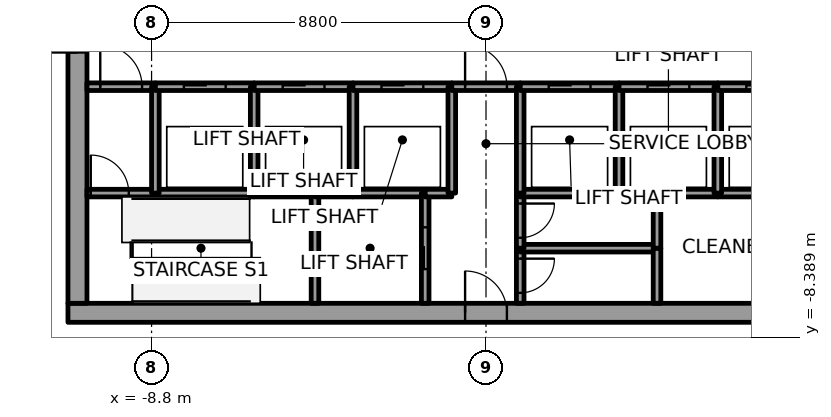
"""IFC4 building model, lengths in metres.
Left out: names, types, materials, properties, quantities, classifications, styles, units other than length and angle.
Written with IfcOpenShell. Run it as: python <this file> out.ifc"""

import sys

from ifc_helpers import new_model, si_unit, direction, frame, frame_2d, origin, place, context, subcontext, project, spatial, rectangle, extrude, element, fill, save


model = new_model("IFC4")
c1 = context("Model", 3, precision=1e-05, world=origin(), true_north=direction((0.0, 1.0)))
c2 = subcontext(c1, "Body", "Model", "MODEL_VIEW")
j1 = project(units=[si_unit("LENGTHUNIT", "METRE"), si_unit("PLANEANGLEUNIT", "RADIAN")], contexts=[c1])
p1 = place(None, origin())
s1 = spatial("IfcSite", under=j1, at=p1, CompositionType="ELEMENT")
p2 = place(p1, origin())
s2 = spatial("IfcBuilding", under=s1, at=p2, CompositionType="ELEMENT")
p3 = place(p2, frame((0.0, 0.0, 185.8)))
s3 = spatial("IfcBuildingStorey", under=s2, at=p3, CompositionType="ELEMENT", Elevation=185.8)
p4 = place(p3, frame((-11.0, -7.75, 0.0), z_axis=(0.0, 0.0, 1.0), x_axis=(1.0, 0.0, 0.0)))
e1 = element("IfcWall", 1, at=p4, inside=s3, PredefinedType="SHEAR", context=c2, shape_type="SweptSolid", body=[
    extrude(rectangle(XDim=22.0, YDim=0.5, at=frame_2d((11.0, 0.0))), origin(), (0.0, 0.0, 1.0), 4.0),
])
p5 = place(p4, frame((10.45, 0.0, 0.0)))
e2 = element("IfcOpeningElement", 2, at=p5, cuts=e1, PredefinedType="OPENING", context=c2, shape_type="SweptSolid", body=[
    extrude(rectangle(XDim=1.1, YDim=2.1, at=frame_2d((0.55, 1.05))), frame((0.0, 0.25, 0.0), z_axis=(0.0, -1.0, 0.0), x_axis=(1.0, 0.0, 0.0)), (0.0, 0.0, 1.0), 0.5),
])
p6 = place(p3, frame((-10.75, -7.5, 0.0), z_axis=(0.0, 0.0, 1.0), x_axis=(0.0, 1.0, 0.0)))
e3 = element("IfcWall", 3, at=p6, inside=s3, PredefinedType="SHEAR", context=c2, shape_type="SweptSolid", body=[
    extrude(rectangle(XDim=15.0, YDim=0.5, at=frame_2d((7.5, 0.0))), origin(), (0.0, 0.0, 1.0), 4.0),
])
p7 = place(p6, frame((6.6, 0.0, 0.0)))
e4 = element("IfcOpeningElement", 4, at=p7, cuts=e3, PredefinedType="OPENING", context=c2, shape_type="SweptSolid", body=[
    extrude(rectangle(XDim=1.8, YDim=2.1, at=frame_2d((0.9, 1.05))), frame((0.0, 0.25, 0.0), z_axis=(0.0, -1.0, 0.0), x_axis=(1.0, 0.0, 0.0)), (0.0, 0.0, 1.0), 0.5),
])
p8 = place(p3, frame((-10.5, -4.6, 0.0), z_axis=(0.0, 0.0, 1.0), x_axis=(1.0, 0.0, 0.0)))
e5 = element("IfcWall", 5, at=p8, inside=s3, PredefinedType="SOLIDWALL", context=c2, shape_type="SweptSolid", body=[
    extrude(rectangle(XDim=1.8, YDim=0.2, at=frame_2d((0.9, 0.0))), origin(), (0.0, 0.0, 1.0), 3.85),
])
p9 = place(p8, frame((0.1, 0.0, 0.0)))
e6 = element("IfcOpeningElement", 6, at=p9, cuts=e5, PredefinedType="OPENING", context=c2, shape_type="SweptSolid", body=[
    extrude(rectangle(XDim=1.0, YDim=2.1, at=frame_2d((0.5, 1.05))), frame((0.0, 0.1, 0.0), z_axis=(0.0, -1.0, 0.0), x_axis=(1.0, 0.0, 0.0)), (0.0, 0.0, 1.0), 0.2),
])
p10 = place(p3, frame((-10.5, -1.8, 0.0), z_axis=(0.0, 0.0, 1.0), x_axis=(1.0, 0.0, 0.0)))
e7 = element("IfcWall", 7, at=p10, inside=s3, PredefinedType="SOLIDWALL", context=c2, shape_type="SweptSolid", body=[
    extrude(rectangle(XDim=1.8, YDim=0.2, at=frame_2d((0.9, 0.0))), origin(), (0.0, 0.0, 1.0), 3.85),
])
p11 = place(p10, frame((0.35, 0.0, 0.0)))
e8 = element("IfcOpeningElement", 8, at=p11, cuts=e7, PredefinedType="OPENING", context=c2, shape_type="SweptSolid", body=[
    extrude(rectangle(XDim=1.1, YDim=2.1, at=frame_2d((0.55, 1.05))), frame((0.0, 0.1, 0.0), z_axis=(0.0, -1.0, 0.0), x_axis=(1.0, 0.0, 0.0)), (0.0, 0.0, 1.0), 0.2),
])
p12 = place(p3, frame((-8.7, -4.6, 0.0), z_axis=(0.0, 0.0, 1.0), x_axis=(1.0, 0.0, 0.0)))
e9 = element("IfcWall", 9, at=p12, inside=s3, PredefinedType="SOLIDWALL", context=c2, shape_type="SweptSolid", body=[
    extrude(rectangle(XDim=2.6, YDim=0.2, at=frame_2d((1.3, 0.0))), origin(), (0.0, 0.0, 1.0), 3.85),
])
p13 = place(p3, frame((-8.7, -4.6, 0.0), z_axis=(0.0, 0.0, 1.0), x_axis=(0.0, 1.0, 0.0)))
e10 = element("IfcWall", 10, at=p13, inside=s3, PredefinedType="SOLIDWALL", context=c2, shape_type="SweptSolid", body=[
    extrude(rectangle(XDim=2.8, YDim=0.2, at=frame_2d((1.4, 0.0))), origin(), (0.0, 0.0, 1.0), 3.85),
])
p14 = place(p3, frame((-8.7, -1.8, 0.0), z_axis=(0.0, 0.0, 1.0), x_axis=(1.0, 0.0, 0.0)))
e11 = element("IfcWall", 11, at=p14, inside=s3, PredefinedType="SOLIDWALL", context=c2, shape_type="SweptSolid", body=[
    extrude(rectangle(XDim=2.6, YDim=0.2, at=frame_2d((1.3, 0.0))), origin(), (0.0, 0.0, 1.0), 3.85),
])
p15 = place(p14, frame((0.75, 0.0, 0.0)))
e12 = element("IfcOpeningElement", 12, at=p15, cuts=e11, PredefinedType="OPENING", context=c2, shape_type="SweptSolid", body=[
    extrude(rectangle(XDim=1.1, YDim=2.1, at=frame_2d((0.55, 1.05))), frame((0.0, 0.1, 0.0), z_axis=(0.0, -1.0, 0.0), x_axis=(1.0, 0.0, 0.0)), (0.0, 0.0, 1.0), 0.2),
])
p16 = place(p3, frame((-6.1, -4.6, 0.0), z_axis=(0.0, 0.0, 1.0), x_axis=(1.0, 0.0, 0.0)))
e13 = element("IfcWall", 13, at=p16, inside=s3, PredefinedType="SOLIDWALL", context=c2, shape_type="SweptSolid", body=[
    extrude(rectangle(XDim=1.6, YDim=0.2, at=frame_2d((0.8, 0.0))), origin(), (0.0, 0.0, 1.0), 3.85),
])
p17 = place(p3, frame((-6.1, -4.6, 0.0), z_axis=(0.0, 0.0, 1.0), x_axis=(0.0, 1.0, 0.0)))
e14 = element("IfcWall", 14, at=p17, inside=s3, PredefinedType="SOLIDWALL", context=c2, shape_type="SweptSolid", body=[
    extrude(rectangle(XDim=2.8, YDim=0.2, at=frame_2d((1.4, 0.0))), origin(), (0.0, 0.0, 1.0), 3.85),
])
p18 = place(p3, frame((-6.1, -1.8, 0.0), z_axis=(0.0, 0.0, 1.0), x_axis=(1.0, 0.0, 0.0)))
e15 = element("IfcWall", 15, at=p18, inside=s3, PredefinedType="SOLIDWALL", context=c2, shape_type="SweptSolid", body=[
    extrude(rectangle(XDim=2.6, YDim=0.2, at=frame_2d((1.3, 0.0))), origin(), (0.0, 0.0, 1.0), 3.85),
])
p19 = place(p18, frame((0.75, 0.0, 0.0)))
e16 = element("IfcOpeningElement", 16, at=p19, cuts=e15, PredefinedType="OPENING", context=c2, shape_type="SweptSolid", body=[
    extrude(rectangle(XDim=1.1, YDim=2.1, at=frame_2d((0.55, 1.05))), frame((0.0, 0.1, 0.0), z_axis=(0.0, -1.0, 0.0), x_axis=(1.0, 0.0, 0.0)), (0.0, 0.0, 1.0), 0.2),
])
p20 = place(p3, frame((-4.5, -4.6, 0.0), z_axis=(0.0, 0.0, 1.0), x_axis=(0.0, -1.0, 0.0)))
e17 = element("IfcWall", 17, at=p20, inside=s3, PredefinedType="SOLIDWALL", context=c2, shape_type="SweptSolid", body=[
    extrude(rectangle(XDim=2.9, YDim=0.2, at=frame_2d((1.45, 0.0))), origin(), (0.0, 0.0, 1.0), 3.85),
])
p21 = place(p3, frame((-4.5, -4.6, 0.0), z_axis=(0.0, 0.0, 1.0), x_axis=(1.0, 0.0, 0.0)))
e18 = element("IfcWall", 18, at=p21, inside=s3, PredefinedType="SOLIDWALL", context=c2, shape_type="SweptSolid", body=[
    extrude(rectangle(XDim=1.0, YDim=0.2, at=frame_2d((0.5, 0.0))), origin(), (0.0, 0.0, 1.0), 3.85),
])
p22 = place(p3, frame((-3.5, -4.6, 0.0), z_axis=(0.0, 0.0, 1.0), x_axis=(1.0, 0.0, 0.0)))
e19 = element("IfcWall", 19, at=p22, inside=s3, PredefinedType="SOLIDWALL", context=c2, shape_type="SweptSolid", body=[
    extrude(rectangle(XDim=1.9, YDim=0.2, at=frame_2d((0.95, 0.0))), origin(), (0.0, 0.0, 1.0), 3.85),
])
p23 = place(p3, frame((-3.5, -4.6, 0.0), z_axis=(0.0, 0.0, 1.0), x_axis=(0.0, 1.0, 0.0)))
e20 = element("IfcWall", 20, at=p23, inside=s3, PredefinedType="SOLIDWALL", context=c2, shape_type="SweptSolid", body=[
    extrude(rectangle(XDim=2.8, YDim=0.2, at=frame_2d((1.4, 0.0))), origin(), (0.0, 0.0, 1.0), 3.85),
])
p24 = place(p3, frame((-3.5, -1.8, 0.0), z_axis=(0.0, 0.0, 1.0), x_axis=(1.0, 0.0, 0.0)))
e21 = element("IfcWall", 21, at=p24, inside=s3, PredefinedType="SOLIDWALL", context=c2, shape_type="SweptSolid", body=[
    extrude(rectangle(XDim=2.6, YDim=0.2, at=frame_2d((1.3, 0.0))), origin(), (0.0, 0.0, 1.0), 3.85),
])
p25 = place(p24, frame((0.75, 0.0, 0.0)))
e22 = element("IfcOpeningElement", 22, at=p25, cuts=e21, PredefinedType="OPENING", context=c2, shape_type="SweptSolid", body=[
    extrude(rectangle(XDim=1.1, YDim=2.1, at=frame_2d((0.55, 1.05))), frame((0.0, 0.1, 0.0), z_axis=(0.0, -1.0, 0.0), x_axis=(1.0, 0.0, 0.0)), (0.0, 0.0, 1.0), 0.2),
])
p26 = place(p3, frame((-1.6, -7.5, 0.0), z_axis=(0.0, 0.0, 1.0), x_axis=(0.0, 1.0, 0.0)))
e23 = element("IfcWall", 23, at=p26, inside=s3, PredefinedType="SOLIDWALL", context=c2, shape_type="SweptSolid", body=[
    extrude(rectangle(XDim=2.9, YDim=0.2, at=frame_2d((1.45, 0.0))), origin(), (0.0, 0.0, 1.0), 3.85),
])
p27 = place(p26, frame((0.9, 0.0, 0.0)))
e24 = element("IfcOpeningElement", 24, at=p27, cuts=e23, PredefinedType="OPENING", context=c2, shape_type="SweptSolid", body=[
    extrude(rectangle(XDim=1.1, YDim=2.1, at=frame_2d((0.55, 1.05))), frame((0.0, 0.1, 0.0), z_axis=(0.0, -1.0, 0.0), x_axis=(1.0, 0.0, 0.0)), (0.0, 0.0, 1.0), 0.2),
])
p28 = place(p3, frame((-1.6, -4.6, 0.0), z_axis=(0.0, 0.0, 1.0), x_axis=(1.0, 0.0, 0.0)))
e25 = element("IfcWall", 25, at=p28, inside=s3, PredefinedType="SOLIDWALL", context=c2, shape_type="SweptSolid", body=[
    extrude(rectangle(XDim=0.7, YDim=0.2, at=frame_2d((0.35, 0.0))), origin(), (0.0, 0.0, 1.0), 3.85),
])
p29 = place(p3, frame((-0.9, -4.6, 0.0), z_axis=(0.0, 0.0, 1.0), x_axis=(0.0, 1.0, 0.0)))
e26 = element("IfcWall", 26, at=p29, inside=s3, PredefinedType="SOLIDWALL", context=c2, shape_type="SweptSolid", body=[
    extrude(rectangle(XDim=2.8, YDim=0.2, at=frame_2d((1.4, 0.0))), origin(), (0.0, 0.0, 1.0), 3.85),
])
p30 = place(p3, frame((-0.9, -1.8, 0.0), z_axis=(0.0, 0.0, 1.0), x_axis=(1.0, 0.0, 0.0)))
e27 = element("IfcWall", 27, at=p30, inside=s3, PredefinedType="SOLIDWALL", context=c2, shape_type="SweptSolid", body=[
    extrude(rectangle(XDim=1.8, YDim=0.2, at=frame_2d((0.9, 0.0))), origin(), (0.0, 0.0, 1.0), 3.85),
])
p31 = place(p30, frame((0.35, 0.0, 0.0)))
e28 = element("IfcOpeningElement", 28, at=p31, cuts=e27, PredefinedType="OPENING", context=c2, shape_type="SweptSolid", body=[
    extrude(rectangle(XDim=1.1, YDim=2.1, at=frame_2d((0.55, 1.05))), frame((0.0, 0.1, 0.0), z_axis=(0.0, -1.0, 0.0), x_axis=(1.0, 0.0, 0.0)), (0.0, 0.0, 1.0), 0.2),
])
p32 = place(p3, frame((0.9, -6.05, 0.0), z_axis=(0.0, 0.0, 1.0), x_axis=(0.0, -1.0, 0.0)))
e29 = element("IfcWall", 29, at=p32, inside=s3, PredefinedType="SOLIDWALL", context=c2, shape_type="SweptSolid", body=[
    extrude(rectangle(XDim=1.45, YDim=0.2, at=frame_2d((0.725, 0.0))), origin(), (0.0, 0.0, 1.0), 3.85),
])
p33 = place(p32, frame((0.275, 0.0, 0.0)))
e30 = element("IfcOpeningElement", 30, at=p33, cuts=e29, PredefinedType="OPENING", context=c2, shape_type="SweptSolid", body=[
    extrude(rectangle(XDim=0.9, YDim=2.1, at=frame_2d((0.45, 1.05))), frame((0.0, 0.1, 0.0), z_axis=(0.0, -1.0, 0.0), x_axis=(1.0, 0.0, 0.0)), (0.0, 0.0, 1.0), 0.2),
])
p34 = place(p3, frame((4.5, -6.05, 0.0), z_axis=(0.0, 0.0, 1.0), x_axis=(-1.0, 0.0, 0.0)))
e31 = element("IfcWall", 31, at=p34, inside=s3, PredefinedType="SOLIDWALL", context=c2, shape_type="SweptSolid", body=[
    extrude(rectangle(XDim=3.6, YDim=0.2, at=frame_2d((1.8, 0.0))), origin(), (0.0, 0.0, 1.0), 3.85),
])
p35 = place(p3, frame((0.9, -4.6, 0.0), z_axis=(0.0, 0.0, 1.0), x_axis=(0.0, -1.0, 0.0)))
e32 = element("IfcWall", 32, at=p35, inside=s3, PredefinedType="SOLIDWALL", context=c2, shape_type="SweptSolid", body=[
    extrude(rectangle(XDim=1.45, YDim=0.2, at=frame_2d((0.725, 0.0))), origin(), (0.0, 0.0, 1.0), 3.85),
])
p36 = place(p35, frame((0.275, 0.0, 0.0)))
e33 = element("IfcOpeningElement", 33, at=p36, cuts=e32, PredefinedType="OPENING", context=c2, shape_type="SweptSolid", body=[
    extrude(rectangle(XDim=0.9, YDim=2.1, at=frame_2d((0.45, 1.05))), frame((0.0, 0.1, 0.0), z_axis=(0.0, -1.0, 0.0), x_axis=(1.0, 0.0, 0.0)), (0.0, 0.0, 1.0), 0.2),
])
p37 = place(p3, frame((3.5, -4.6, 0.0), z_axis=(0.0, 0.0, 1.0), x_axis=(-1.0, 0.0, 0.0)))
e34 = element("IfcWall", 34, at=p37, inside=s3, PredefinedType="SOLIDWALL", context=c2, shape_type="SweptSolid", body=[
    extrude(rectangle(XDim=2.6, YDim=0.2, at=frame_2d((1.3, 0.0))), origin(), (0.0, 0.0, 1.0), 3.85),
])
p38 = place(p3, frame((0.9, -1.8, 0.0), z_axis=(0.0, 0.0, 1.0), x_axis=(0.0, -1.0, 0.0)))
e35 = element("IfcWall", 35, at=p38, inside=s3, PredefinedType="SOLIDWALL", context=c2, shape_type="SweptSolid", body=[
    extrude(rectangle(XDim=2.8, YDim=0.2, at=frame_2d((1.4, 0.0))), origin(), (0.0, 0.0, 1.0), 3.85),
])
p39 = place(p3, frame((0.9, -1.8, 0.0), z_axis=(0.0, 0.0, 1.0), x_axis=(1.0, 0.0, 0.0)))
e36 = element("IfcWall", 36, at=p39, inside=s3, PredefinedType="SOLIDWALL", context=c2, shape_type="SweptSolid", body=[
    extrude(rectangle(XDim=2.6, YDim=0.2, at=frame_2d((1.3, 0.0))), origin(), (0.0, 0.0, 1.0), 3.85),
])
p40 = place(p39, frame((0.75, 0.0, 0.0)))
e37 = element("IfcOpeningElement", 37, at=p40, cuts=e36, PredefinedType="OPENING", context=c2, shape_type="SweptSolid", body=[
    extrude(rectangle(XDim=1.1, YDim=2.1, at=frame_2d((0.55, 1.05))), frame((0.0, 0.1, 0.0), z_axis=(0.0, -1.0, 0.0), x_axis=(1.0, 0.0, 0.0)), (0.0, 0.0, 1.0), 0.2),
])
p41 = place(p3, frame((4.5, -4.6, 0.0), z_axis=(0.0, 0.0, 1.0), x_axis=(-1.0, 0.0, 0.0)))
e38 = element("IfcWall", 38, at=p41, inside=s3, PredefinedType="SOLIDWALL", context=c2, shape_type="SweptSolid", body=[
    extrude(rectangle(XDim=1.0, YDim=0.2, at=frame_2d((0.5, 0.0))), origin(), (0.0, 0.0, 1.0), 3.85),
])
p42 = place(p3, frame((3.5, -4.6, 0.0), z_axis=(0.0, 0.0, 1.0), x_axis=(0.0, 1.0, 0.0)))
e39 = element("IfcWall", 39, at=p42, inside=s3, PredefinedType="SOLIDWALL", context=c2, shape_type="SweptSolid", body=[
    extrude(rectangle(XDim=2.8, YDim=0.2, at=frame_2d((1.4, 0.0))), origin(), (0.0, 0.0, 1.0), 3.85),
])
p43 = place(p3, frame((3.5, -1.8, 0.0), z_axis=(0.0, 0.0, 1.0), x_axis=(1.0, 0.0, 0.0)))
e40 = element("IfcWall", 40, at=p43, inside=s3, PredefinedType="SOLIDWALL", context=c2, shape_type="SweptSolid", body=[
    extrude(rectangle(XDim=2.6, YDim=0.2, at=frame_2d((1.3, 0.0))), origin(), (0.0, 0.0, 1.0), 3.85),
])
p44 = place(p43, frame((0.75, 0.0, 0.0)))
e41 = element("IfcOpeningElement", 41, at=p44, cuts=e40, PredefinedType="OPENING", context=c2, shape_type="SweptSolid", body=[
    extrude(rectangle(XDim=1.1, YDim=2.1, at=frame_2d((0.55, 1.05))), frame((0.0, 0.1, 0.0), z_axis=(0.0, -1.0, 0.0), x_axis=(1.0, 0.0, 0.0)), (0.0, 0.0, 1.0), 0.2),
])
for number, where, z_axis, x_axis in (
    (42, (4.5, -6.05, 0.0), (0.0, 0.0, 1.0), (0.0, -1.0, 0.0)),
    (43, (4.5, -4.6, 0.0), (0.0, 0.0, 1.0), (0.0, -1.0, 0.0)),
):
    element("IfcWall", number, at=place(p3, frame(where, z_axis=z_axis, x_axis=x_axis)), inside=s3, PredefinedType="SOLIDWALL", context=c2, shape_type="SweptSolid", body=[
        extrude(rectangle(XDim=1.45, YDim=0.2, at=frame_2d((0.725, 0.0))), origin(), (0.0, 0.0, 1.0), 3.85),
    ])
p45 = place(p3, frame((6.1, -4.6, 0.0), z_axis=(0.0, 0.0, 1.0), x_axis=(-1.0, 0.0, 0.0)))
e44 = element("IfcWall", 44, at=p45, inside=s3, PredefinedType="SOLIDWALL", context=c2, shape_type="SweptSolid", body=[
    extrude(rectangle(XDim=1.6, YDim=0.2, at=frame_2d((0.8, 0.0))), origin(), (0.0, 0.0, 1.0), 3.85),
])
p46 = place(p3, frame((8.7, -4.6, 0.0), z_axis=(0.0, 0.0, 1.0), x_axis=(-1.0, 0.0, 0.0)))
e45 = element("IfcWall", 45, at=p46, inside=s3, PredefinedType="SOLIDWALL", context=c2, shape_type="SweptSolid", body=[
    extrude(rectangle(XDim=2.6, YDim=0.2, at=frame_2d((1.3, 0.0))), origin(), (0.0, 0.0, 1.0), 3.85),
])
p47 = place(p3, frame((6.1, -4.6, 0.0), z_axis=(0.0, 0.0, 1.0), x_axis=(0.0, 1.0, 0.0)))
e46 = element("IfcWall", 46, at=p47, inside=s3, PredefinedType="SOLIDWALL", context=c2, shape_type="SweptSolid", body=[
    extrude(rectangle(XDim=2.8, YDim=0.2, at=frame_2d((1.4, 0.0))), origin(), (0.0, 0.0, 1.0), 3.85),
])
p48 = place(p3, frame((6.1, -1.8, 0.0), z_axis=(0.0, 0.0, 1.0), x_axis=(1.0, 0.0, 0.0)))
e47 = element("IfcWall", 47, at=p48, inside=s3, PredefinedType="SOLIDWALL", context=c2, shape_type="SweptSolid", body=[
    extrude(rectangle(XDim=2.6, YDim=0.2, at=frame_2d((1.3, 0.0))), origin(), (0.0, 0.0, 1.0), 3.85),
])
p49 = place(p48, frame((0.75, 0.0, 0.0)))
e48 = element("IfcOpeningElement", 48, at=p49, cuts=e47, PredefinedType="OPENING", context=c2, shape_type="SweptSolid", body=[
    extrude(rectangle(XDim=1.1, YDim=2.1, at=frame_2d((0.55, 1.05))), frame((0.0, 0.1, 0.0), z_axis=(0.0, -1.0, 0.0), x_axis=(1.0, 0.0, 0.0)), (0.0, 0.0, 1.0), 0.2),
])
p50 = place(p15, origin())
e49 = element("IfcDoor", 49, at=p50, inside=s3, OperationType="SLIDING_TO_RIGHT", PredefinedType="DOOR", context=c2, shape_type="SweptSolid", body=[
    extrude(rectangle(XDim=1.1, YDim=2.1, at=frame_2d((0.55, 1.05))), frame((0.0, 0.025, 0.0), z_axis=(0.0, -1.0, 0.0), x_axis=(1.0, 0.0, 0.0)), (0.0, 0.0, 1.0), 0.05),
])
fill(e12, e49)
p51 = place(p19, origin())
e50 = element("IfcDoor", 50, at=p51, inside=s3, OperationType="SLIDING_TO_RIGHT", PredefinedType="DOOR", context=c2, shape_type="SweptSolid", body=[
    extrude(rectangle(XDim=1.1, YDim=2.1, at=frame_2d((0.55, 1.05))), frame((0.0, 0.025, 0.0), z_axis=(0.0, -1.0, 0.0), x_axis=(1.0, 0.0, 0.0)), (0.0, 0.0, 1.0), 0.05),
])
fill(e16, e50)
p52 = place(p25, origin())
e51 = element("IfcDoor", 51, at=p52, inside=s3, OperationType="SLIDING_TO_RIGHT", PredefinedType="DOOR", context=c2, shape_type="SweptSolid", body=[
    extrude(rectangle(XDim=1.1, YDim=2.1, at=frame_2d((0.55, 1.05))), frame((0.0, 0.025, 0.0), z_axis=(0.0, -1.0, 0.0), x_axis=(1.0, 0.0, 0.0)), (0.0, 0.0, 1.0), 0.05),
])
fill(e22, e51)
p53 = place(p40, origin())
e52 = element("IfcDoor", 52, at=p53, inside=s3, OperationType="SLIDING_TO_RIGHT", PredefinedType="DOOR", context=c2, shape_type="SweptSolid", body=[
    extrude(rectangle(XDim=1.1, YDim=2.1, at=frame_2d((0.55, 1.05))), frame((0.0, 0.025, 0.0), z_axis=(0.0, -1.0, 0.0), x_axis=(1.0, 0.0, 0.0)), (0.0, 0.0, 1.0), 0.05),
])
fill(e37, e52)
p54 = place(p44, origin())
e53 = element("IfcDoor", 53, at=p54, inside=s3, OperationType="SLIDING_TO_LEFT", PredefinedType="DOOR", context=c2, shape_type="SweptSolid", body=[
    extrude(rectangle(XDim=1.1, YDim=2.1, at=frame_2d((0.55, 1.05))), frame((0.0, 0.025, 0.0), z_axis=(0.0, -1.0, 0.0), x_axis=(1.0, 0.0, 0.0)), (0.0, 0.0, 1.0), 0.05),
])
fill(e41, e53)
p55 = place(p49, origin())
e54 = element("IfcDoor", 54, at=p55, inside=s3, OperationType="SLIDING_TO_RIGHT", PredefinedType="DOOR", context=c2, shape_type="SweptSolid", body=[
    extrude(rectangle(XDim=1.1, YDim=2.1, at=frame_2d((0.55, 1.05))), frame((0.0, 0.025, 0.0), z_axis=(0.0, -1.0, 0.0), x_axis=(1.0, 0.0, 0.0)), (0.0, 0.0, 1.0), 0.05),
])
fill(e48, e54)
p56 = place(p27, origin())
e55 = element("IfcDoor", 55, at=p56, inside=s3, OperationType="SLIDING_TO_RIGHT", PredefinedType="DOOR", context=c2, shape_type="SweptSolid", body=[
    extrude(rectangle(XDim=1.1, YDim=2.1, at=frame_2d((0.55, 1.05))), frame((0.0, 0.025, 0.0), z_axis=(0.0, -1.0, 0.0), x_axis=(1.0, 0.0, 0.0)), (0.0, 0.0, 1.0), 0.05),
])
fill(e24, e55)
p57 = place(p11, origin())
e56 = element("IfcDoor", 56, at=p57, inside=s3, OperationType="SINGLE_SWING_LEFT", PredefinedType="DOOR", context=c2, shape_type="SweptSolid", body=[
    extrude(rectangle(XDim=1.1, YDim=2.1, at=frame_2d((0.55, 1.05))), frame((0.0, 0.025, 0.0), z_axis=(0.0, -1.0, 0.0), x_axis=(1.0, 0.0, 0.0)), (0.0, 0.0, 1.0), 0.05),
])
fill(e8, e56)
p58 = place(p31, origin())
e57 = element("IfcDoor", 57, at=p58, inside=s3, OperationType="SINGLE_SWING_LEFT", PredefinedType="DOOR", context=c2, shape_type="SweptSolid", body=[
    extrude(rectangle(XDim=1.1, YDim=2.1, at=frame_2d((0.55, 1.05))), frame((0.0, 0.025, 0.0), z_axis=(0.0, -1.0, 0.0), x_axis=(1.0, 0.0, 0.0)), (0.0, 0.0, 1.0), 0.05),
])
fill(e28, e57)
p59 = place(p9, origin())
e58 = element("IfcDoor", 58, at=p59, inside=s3, OperationType="SINGLE_SWING_LEFT", PredefinedType="DOOR", context=c2, shape_type="SweptSolid", body=[
    extrude(rectangle(XDim=1.0, YDim=2.1, at=frame_2d((0.5, 1.05))), frame((0.0, 0.025, 0.0), z_axis=(0.0, -1.0, 0.0), x_axis=(1.0, 0.0, 0.0)), (0.0, 0.0, 1.0), 0.05),
])
fill(e6, e58)
p60 = place(p33, origin())
e59 = element("IfcDoor", 59, at=p60, inside=s3, OperationType="SINGLE_SWING_LEFT", PredefinedType="DOOR", context=c2, shape_type="SweptSolid", body=[
    extrude(rectangle(XDim=0.9, YDim=2.1, at=frame_2d((0.45, 1.05))), frame((0.0, 0.025, 0.0), z_axis=(0.0, -1.0, 0.0), x_axis=(1.0, 0.0, 0.0)), (0.0, 0.0, 1.0), 0.05),
])
fill(e30, e59)
p61 = place(p36, origin())
e60 = element("IfcDoor", 60, at=p61, inside=s3, OperationType="SINGLE_SWING_RIGHT", PredefinedType="DOOR", context=c2, shape_type="SweptSolid", body=[
    extrude(rectangle(XDim=0.9, YDim=2.1, at=frame_2d((0.45, 1.05))), frame((0.0, 0.025, 0.0), z_axis=(0.0, -1.0, 0.0), x_axis=(1.0, 0.0, 0.0)), (0.0, 0.0, 1.0), 0.05),
])
fill(e33, e60)
p62 = place(p7, origin())
e61 = element("IfcDoor", 61, at=p62, inside=s3, OperationType="DOUBLE_DOOR_SINGLE_SWING", PredefinedType="DOOR", context=c2, shape_type="SweptSolid", body=[
    extrude(rectangle(XDim=1.8, YDim=2.1, at=frame_2d((0.9, 1.05))), frame((0.0, 0.025, 0.0), z_axis=(0.0, -1.0, 0.0), x_axis=(1.0, 0.0, 0.0)), (0.0, 0.0, 1.0), 0.05),
])
fill(e4, e61)
p63 = place(p5, origin())
e62 = element("IfcDoor", 62, at=p63, inside=s3, OperationType="SINGLE_SWING_RIGHT", PredefinedType="DOOR", context=c2, shape_type="SweptSolid", body=[
    extrude(rectangle(XDim=1.1, YDim=2.1, at=frame_2d((0.55, 1.05))), frame((0.0, 0.025, 0.0), z_axis=(0.0, -1.0, 0.0), x_axis=(1.0, 0.0, 0.0)), (0.0, 0.0, 1.0), 0.05),
])
fill(e2, e62)
save(model, sys.argv[1])
